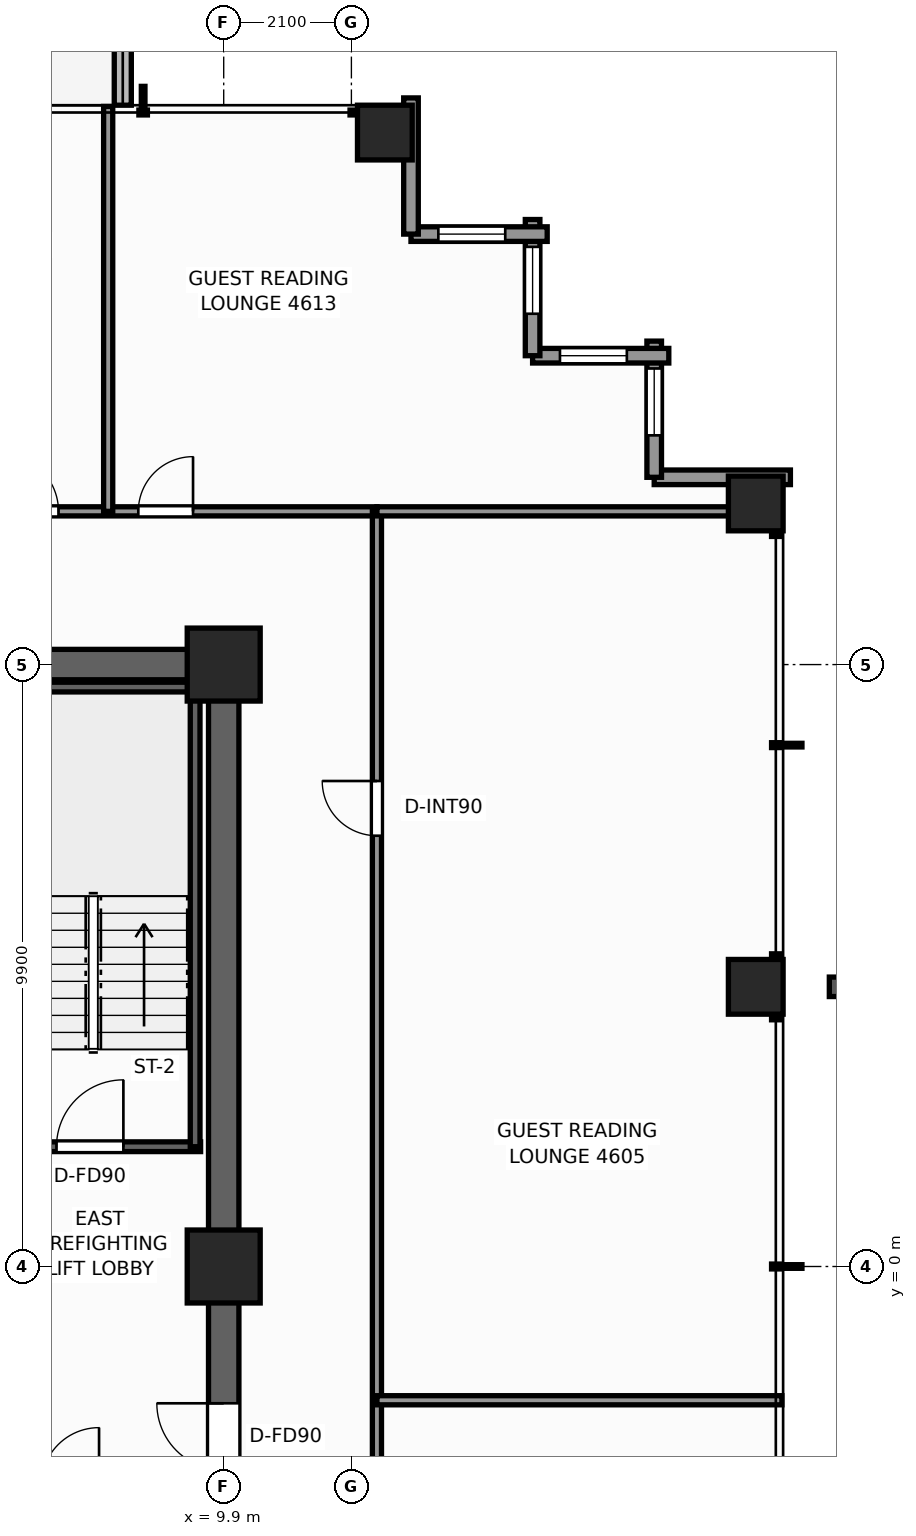
"""IFC4 building model, lengths in metres.
Left out: names, types, materials, properties, quantities, classifications, styles, units other than length and angle.
Written with IfcOpenShell. Run it as: python <this file> out.ifc"""

import sys

from ifc_helpers import new_model, si_unit, direction, frame, frame_2d, origin, origin_2d, place, context, subcontext, project, spatial, rectangle, extrude, element, fill, save


model = new_model("IFC4")
c1 = context("Model", 3, precision=1e-05, world=origin(), true_north=direction((0.0, 1.0)))
c2 = subcontext(c1, "Body", "Model", "MODEL_VIEW")
j1 = project(units=[si_unit("LENGTHUNIT", "METRE"), si_unit("PLANEANGLEUNIT", "RADIAN")], contexts=[c1])
p1 = place(None, origin())
s1 = spatial("IfcSite", under=j1, at=p1, CompositionType="ELEMENT")
p2 = place(p1, origin())
s2 = spatial("IfcBuilding", under=s1, at=p2, CompositionType="ELEMENT")
p3 = place(p2, frame((0.0, 0.0, 160.2)))
s3 = spatial("IfcBuildingStorey", under=s2, at=p3, CompositionType="ELEMENT", Elevation=160.2)
p4 = place(p3, frame((5.98, 9.9, 0.0), z_axis=(0.0, 0.0, 1.0), x_axis=(1.0, 0.0, 0.0)))
e1 = element("IfcWall", 1, at=p4, inside=s3, PredefinedType="SHEAR", context=c2, shape_type="SweptSolid", body=[
    extrude(rectangle(XDim=4.17, YDim=0.5, at=frame_2d((2.085, 0.0))), origin(), (0.0, 0.0, 1.0), 3.3),
])
p5 = place(p3, frame((9.9, -3.7, 0.0), z_axis=(0.0, 0.0, 1.0), x_axis=(0.0, 1.0, 0.0)))
e2 = element("IfcWall", 2, at=p5, inside=s3, PredefinedType="SHEAR", context=c2, shape_type="SweptSolid", body=[
    extrude(rectangle(XDim=13.35, YDim=0.5, at=frame_2d((6.675, 0.0))), origin(), (0.0, 0.0, 1.0), 3.3),
])
p6 = place(p5, frame((0.35, 0.0, 0.0)))
e3 = element("IfcOpeningElement", 3, at=p6, cuts=e2, PredefinedType="OPENING", context=c2, shape_type="SweptSolid", body=[
    extrude(rectangle(XDim=1.1, YDim=2.2, at=frame_2d((0.55, 1.1))), frame((0.0, 0.26, 0.0), z_axis=(0.0, -1.0, 0.0), x_axis=(1.0, 0.0, 0.0)), (0.0, 0.0, 1.0), 0.52),
])
for number, where, z_axis, x_axis in (
    (4, (9.9, 9.9, 0.0), (0.0, 0.0, 1.0), (1.0, 0.0, 0.0)),
    (5, (9.9, 0.0, 0.0), (0.0, 0.0, 1.0), (1.0, 0.0, 0.0)),
):
    element("IfcColumn", number, at=place(p3, frame(where, z_axis=z_axis, x_axis=x_axis)), inside=s3, PredefinedType="COLUMN", context=c2, shape_type="SweptSolid", body=[
        extrude(rectangle(XDim=1.2, YDim=1.2, at=origin_2d()), origin(), (0.0, 0.0, 1.0), 3.3),
    ])
for number, where, z_axis, x_axis in (
    (6, (12.55, 18.65, 0.0), (0.0, 0.0, 1.0), (1.0, 0.0, 0.0)),
    (7, (18.65, 4.6, 0.0), (0.0, 0.0, 1.0), (1.0, 0.0, 0.0)),
    (8, (18.65, 12.55, 0.0), (0.0, 0.0, 1.0), (1.0, 0.0, 0.0)),
):
    element("IfcColumn", number, at=place(p3, frame(where, z_axis=z_axis, x_axis=x_axis)), inside=s3, PredefinedType="COLUMN", context=c2, shape_type="SweptSolid", body=[
        extrude(rectangle(XDim=0.9, YDim=0.9, at=origin_2d()), origin(), (0.0, 0.0, 1.0), 3.3),
    ])
p7 = place(p3, frame((8.24, 19.1, -0.02), z_axis=(0.0, 0.0, 1.0), x_axis=(0.0, 1.0, 0.0)))
e9 = element("IfcWall", 9, at=p7, inside=s3, PredefinedType="PARAPET", context=c2, shape_type="SweptSolid", body=[
    extrude(rectangle(XDim=2.34, YDim=0.28, at=frame_2d((1.17, 0.0))), origin(), (0.0, 0.0, 1.0), 0.42),
])
p8 = place(p3, frame((16.98, 12.98, 0.0), z_axis=(0.0, 0.0, 1.0), x_axis=(1.0, 0.0, 0.0)))
e10 = element("IfcWall", 10, at=p8, inside=s3, PredefinedType="STANDARD", context=c2, shape_type="SweptSolid", body=[
    extrude(rectangle(XDim=2.24, YDim=0.24, at=frame_2d((1.12, 0.0))), origin(), (0.0, 0.0, 1.0), 2.483),
])
p9 = place(p3, frame((16.98, 15.22, 0.0), z_axis=(0.0, 0.0, 1.0), x_axis=(0.0, -1.0, 0.0)))
e11 = element("IfcWall", 11, at=p9, inside=s3, PredefinedType="STANDARD", context=c2, shape_type="SweptSolid", body=[
    extrude(rectangle(XDim=2.24, YDim=0.24, at=frame_2d((1.12, 0.0))), origin(), (0.0, 0.0, 1.0), 2.483),
])
p10 = place(p9, frame((0.45, 0.0, 0.65)))
e12 = element("IfcOpeningElement", 12, at=p10, cuts=e11, PredefinedType="OPENING", context=c2, shape_type="SweptSolid", body=[
    extrude(rectangle(XDim=1.1, YDim=1.45, at=frame_2d((0.55, 0.725))), frame((0.0, 0.13, 0.0), z_axis=(0.0, -1.0, 0.0), x_axis=(1.0, 0.0, 0.0)), (0.0, 0.0, 1.0), 0.26),
])
p11 = place(p3, frame((14.98, 14.98, 0.0), z_axis=(0.0, 0.0, 1.0), x_axis=(1.0, 0.0, 0.0)))
e13 = element("IfcWall", 13, at=p11, inside=s3, PredefinedType="STANDARD", context=c2, shape_type="SweptSolid", body=[
    extrude(rectangle(XDim=2.24, YDim=0.24, at=frame_2d((1.12, 0.0))), origin(), (0.0, 0.0, 1.0), 2.483),
])
p12 = place(p11, frame((0.45, 0.0, 0.65)))
e14 = element("IfcOpeningElement", 14, at=p12, cuts=e13, PredefinedType="OPENING", context=c2, shape_type="SweptSolid", body=[
    extrude(rectangle(XDim=1.1, YDim=1.45, at=frame_2d((0.55, 0.725))), frame((0.0, 0.13, 0.0), z_axis=(0.0, -1.0, 0.0), x_axis=(1.0, 0.0, 0.0)), (0.0, 0.0, 1.0), 0.26),
])
p13 = place(p3, frame((14.98, 17.22, 0.0), z_axis=(0.0, 0.0, 1.0), x_axis=(0.0, -1.0, 0.0)))
e15 = element("IfcWall", 15, at=p13, inside=s3, PredefinedType="STANDARD", context=c2, shape_type="SweptSolid", body=[
    extrude(rectangle(XDim=2.24, YDim=0.24, at=frame_2d((1.12, 0.0))), origin(), (0.0, 0.0, 1.0), 2.483),
])
p14 = place(p13, frame((0.45, 0.0, 0.65)))
e16 = element("IfcOpeningElement", 16, at=p14, cuts=e15, PredefinedType="OPENING", context=c2, shape_type="SweptSolid", body=[
    extrude(rectangle(XDim=1.1, YDim=1.45, at=frame_2d((0.55, 0.725))), frame((0.0, 0.13, 0.0), z_axis=(0.0, -1.0, 0.0), x_axis=(1.0, 0.0, 0.0)), (0.0, 0.0, 1.0), 0.26),
])
p15 = place(p3, frame((12.98, 16.98, 0.0), z_axis=(0.0, 0.0, 1.0), x_axis=(1.0, 0.0, 0.0)))
e17 = element("IfcWall", 17, at=p15, inside=s3, PredefinedType="STANDARD", context=c2, shape_type="SweptSolid", body=[
    extrude(rectangle(XDim=2.24, YDim=0.24, at=frame_2d((1.12, 0.0))), origin(), (0.0, 0.0, 1.0), 2.483),
])
p16 = place(p15, frame((0.45, 0.0, 0.65)))
e18 = element("IfcOpeningElement", 18, at=p16, cuts=e17, PredefinedType="OPENING", context=c2, shape_type="SweptSolid", body=[
    extrude(rectangle(XDim=1.1, YDim=1.45, at=frame_2d((0.55, 0.725))), frame((0.0, 0.13, 0.0), z_axis=(0.0, -1.0, 0.0), x_axis=(1.0, 0.0, 0.0)), (0.0, 0.0, 1.0), 0.26),
])
p17 = place(p3, frame((12.98, 19.22, 0.0), z_axis=(0.0, 0.0, 1.0), x_axis=(0.0, -1.0, 0.0)))
e19 = element("IfcWall", 19, at=p17, inside=s3, PredefinedType="STANDARD", context=c2, shape_type="SweptSolid", body=[
    extrude(rectangle(XDim=2.24, YDim=0.24, at=frame_2d((1.12, 0.0))), origin(), (0.0, 0.0, 1.0), 2.483),
])
p18 = place(p3, frame((6.0, 1.97, 0.0), z_axis=(0.0, 0.0, 1.0), x_axis=(1.0, 0.0, 0.0)))
e20 = element("IfcWall", 20, at=p18, inside=s3, PredefinedType="SHEAR", context=c2, shape_type="SweptSolid", body=[
    extrude(rectangle(XDim=3.52, YDim=0.16, at=frame_2d((1.76, 0.0))), origin(), (0.0, 0.0, 1.0), 3.3),
])
p19 = place(p18, frame((1.15, 0.0, 0.0)))
e21 = element("IfcOpeningElement", 21, at=p19, cuts=e20, PredefinedType="OPENING", context=c2, shape_type="SweptSolid", body=[
    extrude(rectangle(XDim=1.1, YDim=2.2, at=frame_2d((0.55, 1.1))), frame((0.0, 0.09, 0.0), z_axis=(0.0, -1.0, 0.0), x_axis=(1.0, 0.0, 0.0)), (0.0, 0.0, 1.0), 0.18),
])
p20 = place(p3, frame((6.0, 9.53, 0.0), z_axis=(0.0, 0.0, 1.0), x_axis=(1.0, 0.0, 0.0)))
e22 = element("IfcWall", 22, at=p20, inside=s3, PredefinedType="SHEAR", context=c2, shape_type="SweptSolid", body=[
    extrude(rectangle(XDim=3.52, YDim=0.16, at=frame_2d((1.76, 0.0))), origin(), (0.0, 0.0, 1.0), 3.3),
])
p21 = place(p3, frame((9.43, 1.97, 0.0), z_axis=(0.0, 0.0, 1.0), x_axis=(0.0, 1.0, 0.0)))
e23 = element("IfcWall", 23, at=p21, inside=s3, PredefinedType="SHEAR", context=c2, shape_type="SweptSolid", body=[
    extrude(rectangle(XDim=7.56, YDim=0.16, at=frame_2d((3.78, 0.0))), origin(), (0.0, 0.0, 1.0), 3.3),
])
p22 = place(p3, frame((-12.42, 12.42, 0.0), z_axis=(0.0, 0.0, 1.0), x_axis=(1.0, 0.0, 0.0)))
e24 = element("IfcWall", 24, at=p22, inside=s3, PredefinedType="PARTITIONING", context=c2, shape_type="SweptSolid", body=[
    extrude(rectangle(XDim=24.84, YDim=0.15, at=frame_2d((12.42, 0.0))), origin(), (0.0, 0.0, 1.0), 2.389),
])
p23 = place(p22, frame((3.831, 0.0, 0.0)))
e25 = element("IfcOpeningElement", 25, at=p23, cuts=e24, PredefinedType="OPENING", context=c2, shape_type="SweptSolid", body=[
    extrude(rectangle(XDim=0.95, YDim=2.06, at=frame_2d((0.475, 1.03))), frame((0.0, 0.085, 0.0), z_axis=(0.0, -1.0, 0.0), x_axis=(1.0, 0.0, 0.0)), (0.0, 0.0, 1.0), 0.17),
])
p24 = place(p22, frame((5.877, 0.0, 0.0)))
e26 = element("IfcOpeningElement", 26, at=p24, cuts=e24, PredefinedType="OPENING", context=c2, shape_type="SweptSolid", body=[
    extrude(rectangle(XDim=0.9, YDim=2.06, at=frame_2d((0.45, 1.03))), frame((0.0, 0.085, 0.0), z_axis=(0.0, -1.0, 0.0), x_axis=(1.0, 0.0, 0.0)), (0.0, 0.0, 1.0), 0.17),
])
p25 = place(p22, frame((13.146, 0.0, 0.0)))
e27 = element("IfcOpeningElement", 27, at=p25, cuts=e24, PredefinedType="OPENING", context=c2, shape_type="SweptSolid", body=[
    extrude(rectangle(XDim=0.95, YDim=2.06, at=frame_2d((0.475, 1.03))), frame((0.0, 0.085, 0.0), z_axis=(0.0, -1.0, 0.0), x_axis=(1.0, 0.0, 0.0)), (0.0, 0.0, 1.0), 0.17),
])
p26 = place(p22, frame((18.653, 0.0, 0.0)))
e28 = element("IfcOpeningElement", 28, at=p26, cuts=e24, PredefinedType="OPENING", context=c2, shape_type="SweptSolid", body=[
    extrude(rectangle(XDim=0.95, YDim=2.06, at=frame_2d((0.475, 1.03))), frame((0.0, 0.085, 0.0), z_axis=(0.0, -1.0, 0.0), x_axis=(1.0, 0.0, 0.0)), (0.0, 0.0, 1.0), 0.17),
])
p27 = place(p22, frame((20.916, 0.0, 0.0)))
e29 = element("IfcOpeningElement", 29, at=p27, cuts=e24, PredefinedType="OPENING", context=c2, shape_type="SweptSolid", body=[
    extrude(rectangle(XDim=0.9, YDim=2.06, at=frame_2d((0.45, 1.03))), frame((0.0, 0.085, 0.0), z_axis=(0.0, -1.0, 0.0), x_axis=(1.0, 0.0, 0.0)), (0.0, 0.0, 1.0), 0.17),
])
p28 = place(p3, frame((12.42, -12.42, 0.0), z_axis=(0.0, 0.0, 1.0), x_axis=(0.0, 1.0, 0.0)))
e30 = element("IfcWall", 30, at=p28, inside=s3, PredefinedType="PARTITIONING", context=c2, shape_type="SweptSolid", body=[
    extrude(rectangle(XDim=24.84, YDim=0.15, at=frame_2d((12.42, 0.0))), origin(), (0.0, 0.0, 1.0), 2.389),
])
p29 = place(p28, frame((4.435, 0.0, 0.0)))
e31 = element("IfcOpeningElement", 31, at=p29, cuts=e30, PredefinedType="OPENING", context=c2, shape_type="SweptSolid", body=[
    extrude(rectangle(XDim=0.9, YDim=2.06, at=frame_2d((0.45, 1.03))), frame((0.0, 0.085, 0.0), z_axis=(0.0, -1.0, 0.0), x_axis=(1.0, 0.0, 0.0)), (0.0, 0.0, 1.0), 0.17),
])
p30 = place(p28, frame((19.505, 0.0, 0.0)))
e32 = element("IfcOpeningElement", 32, at=p30, cuts=e30, PredefinedType="OPENING", context=c2, shape_type="SweptSolid", body=[
    extrude(rectangle(XDim=0.9, YDim=2.06, at=frame_2d((0.45, 1.03))), frame((0.0, 0.085, 0.0), z_axis=(0.0, -1.0, 0.0), x_axis=(1.0, 0.0, 0.0)), (0.0, 0.0, 1.0), 0.17),
])
p31 = place(p3, frame((12.42, 12.42, 0.0), z_axis=(0.0, 0.0, 1.0), x_axis=(1.0, 0.0, 0.0)))
e33 = element("IfcWall", 33, at=p31, inside=s3, PredefinedType="PARTITIONING", context=c2, shape_type="SweptSolid", body=[
    extrude(rectangle(XDim=6.66, YDim=0.15, at=frame_2d((3.33, 0.0))), origin(), (0.0, 0.0, 1.0), 2.389),
])
for number, where, z_axis, x_axis in (
    (34, (12.42, -2.2, 0.0), (0.0, 0.0, 1.0), (1.0, 0.0, 0.0)),
    (35, (8.0, 12.42, 0.0), (0.0, 0.0, 1.0), (0.0, 1.0, 0.0)),
):
    element("IfcWall", number, at=place(p3, frame(where, z_axis=z_axis, x_axis=x_axis)), inside=s3, PredefinedType="PARTITIONING", context=c2, shape_type="SweptSolid", body=[
        extrude(rectangle(XDim=6.66, YDim=0.15, at=frame_2d((3.33, 0.0))), origin(), (0.0, 0.0, 1.0), 2.473),
    ])
p32 = place(p10, origin())
e36 = element("IfcWindow", 36, at=p32, inside=s3, PartitioningType="SINGLE_PANEL", PredefinedType="WINDOW", context=c2, shape_type="SweptSolid", body=[
    extrude(rectangle(XDim=1.1, YDim=1.45, at=frame_2d((0.55, 0.725))), frame((0.0, 0.03, 0.0), z_axis=(0.0, -1.0, 0.0), x_axis=(1.0, 0.0, 0.0)), (0.0, 0.0, 1.0), 0.06),
])
fill(e12, e36)
p33 = place(p12, origin())
e37 = element("IfcWindow", 37, at=p33, inside=s3, PartitioningType="SINGLE_PANEL", PredefinedType="WINDOW", context=c2, shape_type="SweptSolid", body=[
    extrude(rectangle(XDim=1.1, YDim=1.45, at=frame_2d((0.55, 0.725))), frame((0.0, 0.03, 0.0), z_axis=(0.0, -1.0, 0.0), x_axis=(1.0, 0.0, 0.0)), (0.0, 0.0, 1.0), 0.06),
])
fill(e14, e37)
p34 = place(p14, origin())
e38 = element("IfcWindow", 38, at=p34, inside=s3, PartitioningType="SINGLE_PANEL", PredefinedType="WINDOW", context=c2, shape_type="SweptSolid", body=[
    extrude(rectangle(XDim=1.1, YDim=1.45, at=frame_2d((0.55, 0.725))), frame((0.0, 0.03, 0.0), z_axis=(0.0, -1.0, 0.0), x_axis=(1.0, 0.0, 0.0)), (0.0, 0.0, 1.0), 0.06),
])
fill(e16, e38)
p35 = place(p16, origin())
e39 = element("IfcWindow", 39, at=p35, inside=s3, PartitioningType="SINGLE_PANEL", PredefinedType="WINDOW", context=c2, shape_type="SweptSolid", body=[
    extrude(rectangle(XDim=1.1, YDim=1.45, at=frame_2d((0.55, 0.725))), frame((0.0, 0.03, 0.0), z_axis=(0.0, -1.0, 0.0), x_axis=(1.0, 0.0, 0.0)), (0.0, 0.0, 1.0), 0.06),
])
fill(e18, e39)
p36 = place(p19, origin())
e40 = element("IfcDoor", 40, at=p36, inside=s3, OperationType="SINGLE_SWING_RIGHT", PredefinedType="DOOR", context=c2, shape_type="SweptSolid", body=[
    extrude(rectangle(XDim=1.1, YDim=2.2, at=frame_2d((0.55, 1.1))), frame((0.0, 0.025, 0.0), z_axis=(0.0, -1.0, 0.0), x_axis=(1.0, 0.0, 0.0)), (0.0, 0.0, 1.0), 0.05),
])
fill(e21, e40)
p37 = place(p6, origin())
e41 = element("IfcDoor", 41, at=p37, inside=s3, OperationType="SINGLE_SWING_RIGHT", PredefinedType="DOOR", context=c2, shape_type="SweptSolid", body=[
    extrude(rectangle(XDim=1.1, YDim=2.2, at=frame_2d((0.55, 1.1))), frame((0.0, 0.025, 0.0), z_axis=(0.0, -1.0, 0.0), x_axis=(1.0, 0.0, 0.0)), (0.0, 0.0, 1.0), 0.05),
])
fill(e3, e41)
p38 = place(p30, origin())
e42 = element("IfcDoor", 42, at=p38, inside=s3, OperationType="SINGLE_SWING_RIGHT", PredefinedType="DOOR", context=c2, shape_type="SweptSolid", body=[
    extrude(rectangle(XDim=0.9, YDim=2.06, at=frame_2d((0.45, 1.03))), frame((0.0, 0.025, 0.0), z_axis=(0.0, -1.0, 0.0), x_axis=(1.0, 0.0, 0.0)), (0.0, 0.0, 1.0), 0.05),
])
fill(e32, e42)
p39 = place(p26, origin())
e43 = element("IfcDoor", 43, at=p39, inside=s3, OperationType="SINGLE_SWING_LEFT", PredefinedType="DOOR", context=c2, shape_type="SweptSolid", body=[
    extrude(rectangle(XDim=0.95, YDim=2.06, at=frame_2d((0.475, 1.03))), frame((0.0, 0.025, 0.0), z_axis=(0.0, -1.0, 0.0), x_axis=(1.0, 0.0, 0.0)), (0.0, 0.0, 1.0), 0.05),
])
fill(e28, e43)
p40 = place(p27, origin())
e44 = element("IfcDoor", 44, at=p40, inside=s3, OperationType="SINGLE_SWING_RIGHT", PredefinedType="DOOR", context=c2, shape_type="SweptSolid", body=[
    extrude(rectangle(XDim=0.9, YDim=2.06, at=frame_2d((0.45, 1.03))), frame((0.0, 0.025, 0.0), z_axis=(0.0, -1.0, 0.0), x_axis=(1.0, 0.0, 0.0)), (0.0, 0.0, 1.0), 0.05),
])
fill(e29, e44)
save(model, sys.argv[1])
